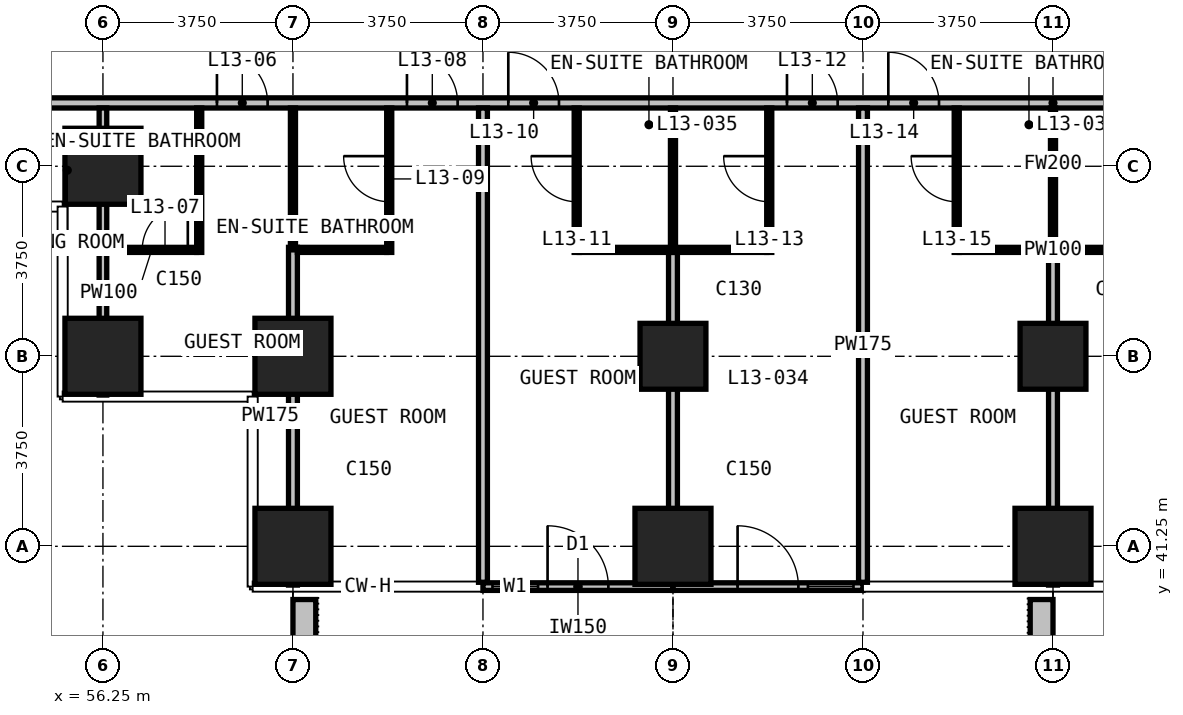
"""IFC4 building model, lengths in metres.
Left out: names, types, materials, properties, quantities, classifications, styles, units other than length and angle.
Written with IfcOpenShell. Run it as: python <this file> out.ifc"""

import sys

from ifc_helpers import new_model, si_unit, direction, frame, frame_2d, origin, origin_2d, place, context, subcontext, project, spatial, rectangle, extrude, element, fill, save


model = new_model("IFC4")
c1 = context("Model", 3, precision=1e-05, world=origin(), true_north=direction((0.0, 1.0)))
c2 = subcontext(c1, "Body", "Model", "MODEL_VIEW")
j1 = project(units=[si_unit("LENGTHUNIT", "METRE"), si_unit("PLANEANGLEUNIT", "RADIAN")], contexts=[c1])
p1 = place(None, origin())
s1 = spatial("IfcSite", under=j1, at=p1, CompositionType="ELEMENT")
p2 = place(p1, origin())
s2 = spatial("IfcBuilding", under=s1, at=p2, CompositionType="ELEMENT")
p3 = place(p2, frame((0.0, 0.0, 62.6)))
s3 = spatial("IfcBuildingStorey", under=s2, at=p3, CompositionType="ELEMENT", Elevation=62.6)
for number, where, z_axis, x_axis in (
    (1, (56.25, 45.0, 0.0), (0.0, 0.0, 1.0), (1.0, 0.0, 0.0)),
    (2, (56.25, 48.75, 0.0), (0.0, 0.0, 1.0), (1.0, 0.0, 0.0)),
    (3, (60.0, 41.25, 0.0), (0.0, 0.0, 1.0), (1.0, 0.0, 0.0)),
    (4, (60.0, 45.0, 0.0), (0.0, 0.0, 1.0), (1.0, 0.0, 0.0)),
    (5, (67.5, 41.25, 0.0), (0.0, 0.0, 1.0), (1.0, 0.0, 0.0)),
):
    element("IfcColumn", number, at=place(p3, frame(where, z_axis=z_axis, x_axis=x_axis)), inside=s3, PredefinedType="COLUMN", context=c2, shape_type="SweptSolid", body=[
        extrude(rectangle(XDim=1.5, YDim=1.5, at=origin_2d()), origin(), (0.0, 0.0, 1.0), 3.3),
    ])
p4 = place(p3, frame((67.5, 45.0, 0.0), z_axis=(0.0, 0.0, 1.0), x_axis=(1.0, 0.0, 0.0)))
e6 = element("IfcColumn", 6, at=p4, inside=s3, PredefinedType="COLUMN", context=c2, shape_type="SweptSolid", body=[
    extrude(rectangle(XDim=1.3, YDim=1.3, at=origin_2d()), origin(), (0.0, 0.0, 1.0), 3.3),
])
p5 = place(p3, frame((75.0, 41.25, 0.0), z_axis=(0.0, 0.0, 1.0), x_axis=(1.0, 0.0, 0.0)))
e7 = element("IfcColumn", 7, at=p5, inside=s3, PredefinedType="COLUMN", context=c2, shape_type="SweptSolid", body=[
    extrude(rectangle(XDim=1.5, YDim=1.5, at=origin_2d()), origin(), (0.0, 0.0, 1.0), 3.3),
])
p6 = place(p3, frame((75.0, 45.0, 0.0), z_axis=(0.0, 0.0, 1.0), x_axis=(1.0, 0.0, 0.0)))
e8 = element("IfcColumn", 8, at=p6, inside=s3, PredefinedType="COLUMN", context=c2, shape_type="SweptSolid", body=[
    extrude(rectangle(XDim=1.3, YDim=1.3, at=origin_2d()), origin(), (0.0, 0.0, 1.0), 3.3),
])
p7 = place(p3, frame((63.75, 40.455, 0.0), z_axis=(0.0, 0.0, 1.0), x_axis=(1.0, 0.0, 0.0)))
e9 = element("IfcWall", 9, at=p7, inside=s3, PredefinedType="SOLIDWALL", context=c2, shape_type="SweptSolid", body=[
    extrude(rectangle(XDim=3.75, YDim=0.15, at=frame_2d((1.875, 0.0))), origin(), (0.0, 0.0, 1.0), 3.0),
])
p8 = place(p7, frame((0.188, 0.0, 0.1)))
e10 = element("IfcOpeningElement", 10, at=p8, cuts=e9, PredefinedType="OPENING", context=c2, shape_type="SweptSolid", body=[
    extrude(rectangle(XDim=0.9, YDim=2.4, at=frame_2d((0.45, 1.2))), frame((0.0, 0.085, 0.0), z_axis=(0.0, -1.0, 0.0), x_axis=(1.0, 0.0, 0.0)), (0.0, 0.0, 1.0), 0.17),
])
p9 = place(p7, frame((1.275, 0.0, 0.0)))
e11 = element("IfcOpeningElement", 11, at=p9, cuts=e9, PredefinedType="OPENING", context=c2, shape_type="SweptSolid", body=[
    extrude(rectangle(XDim=1.2, YDim=2.4, at=frame_2d((0.6, 1.2))), frame((0.0, 0.085, 0.0), z_axis=(0.0, -1.0, 0.0), x_axis=(1.0, 0.0, 0.0)), (0.0, 0.0, 1.0), 0.17),
])
p10 = place(p3, frame((67.5, 40.455, 0.0), z_axis=(0.0, 0.0, 1.0), x_axis=(1.0, 0.0, 0.0)))
e12 = element("IfcWall", 12, at=p10, inside=s3, PredefinedType="SOLIDWALL", context=c2, shape_type="SweptSolid", body=[
    extrude(rectangle(XDim=3.75, YDim=0.15, at=frame_2d((1.875, 0.0))), origin(), (0.0, 0.0, 1.0), 3.0),
])
p11 = place(p10, frame((1.275, 0.0, 0.0)))
e13 = element("IfcOpeningElement", 13, at=p11, cuts=e12, PredefinedType="OPENING", context=c2, shape_type="SweptSolid", body=[
    extrude(rectangle(XDim=1.2, YDim=2.4, at=frame_2d((0.6, 1.2))), frame((0.0, 0.085, 0.0), z_axis=(0.0, -1.0, 0.0), x_axis=(1.0, 0.0, 0.0)), (0.0, 0.0, 1.0), 0.17),
])
p12 = place(p10, frame((2.663, 0.0, 0.1)))
e14 = element("IfcOpeningElement", 14, at=p12, cuts=e12, PredefinedType="OPENING", context=c2, shape_type="SweptSolid", body=[
    extrude(rectangle(XDim=0.9, YDim=2.4, at=frame_2d((0.45, 1.2))), frame((0.0, 0.085, 0.0), z_axis=(0.0, -1.0, 0.0), x_axis=(1.0, 0.0, 0.0)), (0.0, 0.0, 1.0), 0.17),
])
for number, where, z_axis, x_axis in (
    (15, (60.225, 40.2, 0.0), (0.0, 0.0, 1.0), (0.0, -1.0, 0.0)),
    (16, (74.775, 40.2, 0.0), (0.0, 0.0, 1.0), (0.0, -1.0, 0.0)),
):
    element("IfcWall", number, at=place(p3, frame(where, z_axis=z_axis, x_axis=x_axis)), inside=s3, PredefinedType="USERDEFINED", context=c2, shape_type="SweptSolid", body=[
        extrude(rectangle(XDim=2.35, YDim=0.45, at=frame_2d((1.175, 0.0))), origin(), (0.0, 0.0, 1.0), 1.1),
    ])
p13 = place(p3, frame((51.735, 50.0, 0.0), z_axis=(0.0, 0.0, 1.0), x_axis=(1.0, 0.0, 0.0)))
e17 = element("IfcWall", 17, at=p13, inside=s3, PredefinedType="PARTITIONING", context=c2, shape_type="SweptSolid", body=[
    extrude(rectangle(XDim=46.53, YDim=0.2, at=frame_2d((23.265, 0.0))), origin(), (0.0, 0.0, 1.0), 3.0),
])
p14 = place(p13, frame((6.765, 0.0, 0.0)))
e18 = element("IfcOpeningElement", 18, at=p14, cuts=e17, PredefinedType="OPENING", context=c2, shape_type="SweptSolid", body=[
    extrude(rectangle(XDim=1.0, YDim=2.2, at=frame_2d((0.5, 1.1))), frame((0.0, 0.11, 0.0), z_axis=(0.0, -1.0, 0.0), x_axis=(1.0, 0.0, 0.0)), (0.0, 0.0, 1.0), 0.22),
])
p15 = place(p13, frame((10.515, 0.0, 0.0)))
e19 = element("IfcOpeningElement", 19, at=p15, cuts=e17, PredefinedType="OPENING", context=c2, shape_type="SweptSolid", body=[
    extrude(rectangle(XDim=1.0, YDim=2.2, at=frame_2d((0.5, 1.1))), frame((0.0, 0.11, 0.0), z_axis=(0.0, -1.0, 0.0), x_axis=(1.0, 0.0, 0.0)), (0.0, 0.0, 1.0), 0.22),
])
p16 = place(p13, frame((12.515, 0.0, 0.0)))
e20 = element("IfcOpeningElement", 20, at=p16, cuts=e17, PredefinedType="OPENING", context=c2, shape_type="SweptSolid", body=[
    extrude(rectangle(XDim=1.0, YDim=2.2, at=frame_2d((0.5, 1.1))), frame((0.0, 0.11, 0.0), z_axis=(0.0, -1.0, 0.0), x_axis=(1.0, 0.0, 0.0)), (0.0, 0.0, 1.0), 0.22),
])
p17 = place(p13, frame((18.015, 0.0, 0.0)))
e21 = element("IfcOpeningElement", 21, at=p17, cuts=e17, PredefinedType="OPENING", context=c2, shape_type="SweptSolid", body=[
    extrude(rectangle(XDim=1.0, YDim=2.2, at=frame_2d((0.5, 1.1))), frame((0.0, 0.11, 0.0), z_axis=(0.0, -1.0, 0.0), x_axis=(1.0, 0.0, 0.0)), (0.0, 0.0, 1.0), 0.22),
])
p18 = place(p13, frame((20.015, 0.0, 0.0)))
e22 = element("IfcOpeningElement", 22, at=p18, cuts=e17, PredefinedType="OPENING", context=c2, shape_type="SweptSolid", body=[
    extrude(rectangle(XDim=1.0, YDim=2.2, at=frame_2d((0.5, 1.1))), frame((0.0, 0.11, 0.0), z_axis=(0.0, -1.0, 0.0), x_axis=(1.0, 0.0, 0.0)), (0.0, 0.0, 1.0), 0.22),
])
p19 = place(p13, frame((25.515, 0.0, 0.0)))
e23 = element("IfcOpeningElement", 23, at=p19, cuts=e17, PredefinedType="OPENING", context=c2, shape_type="SweptSolid", body=[
    extrude(rectangle(XDim=1.0, YDim=2.2, at=frame_2d((0.5, 1.1))), frame((0.0, 0.11, 0.0), z_axis=(0.0, -1.0, 0.0), x_axis=(1.0, 0.0, 0.0)), (0.0, 0.0, 1.0), 0.22),
])
p20 = place(p13, frame((27.515, 0.0, 0.0)))
e24 = element("IfcOpeningElement", 24, at=p20, cuts=e17, PredefinedType="OPENING", context=c2, shape_type="SweptSolid", body=[
    extrude(rectangle(XDim=1.0, YDim=2.2, at=frame_2d((0.5, 1.1))), frame((0.0, 0.11, 0.0), z_axis=(0.0, -1.0, 0.0), x_axis=(1.0, 0.0, 0.0)), (0.0, 0.0, 1.0), 0.22),
])
p21 = place(p13, frame((33.015, 0.0, 0.0)))
e25 = element("IfcOpeningElement", 25, at=p21, cuts=e17, PredefinedType="OPENING", context=c2, shape_type="SweptSolid", body=[
    extrude(rectangle(XDim=1.0, YDim=2.2, at=frame_2d((0.5, 1.1))), frame((0.0, 0.11, 0.0), z_axis=(0.0, -1.0, 0.0), x_axis=(1.0, 0.0, 0.0)), (0.0, 0.0, 1.0), 0.22),
])
p22 = place(p13, frame((35.015, 0.0, 0.0)))
e26 = element("IfcOpeningElement", 26, at=p22, cuts=e17, PredefinedType="OPENING", context=c2, shape_type="SweptSolid", body=[
    extrude(rectangle(XDim=1.0, YDim=2.2, at=frame_2d((0.5, 1.1))), frame((0.0, 0.11, 0.0), z_axis=(0.0, -1.0, 0.0), x_axis=(1.0, 0.0, 0.0)), (0.0, 0.0, 1.0), 0.22),
])
p23 = place(p13, frame((38.765, 0.0, 0.0)))
e27 = element("IfcOpeningElement", 27, at=p23, cuts=e17, PredefinedType="OPENING", context=c2, shape_type="SweptSolid", body=[
    extrude(rectangle(XDim=1.0, YDim=2.2, at=frame_2d((0.5, 1.1))), frame((0.0, 0.11, 0.0), z_axis=(0.0, -1.0, 0.0), x_axis=(1.0, 0.0, 0.0)), (0.0, 0.0, 1.0), 0.22),
])
p24 = place(p13, frame((1.8, 0.0, 0.0)))
e28 = element("IfcOpeningElement", 28, at=p24, cuts=e17, PredefinedType="OPENING", context=c2, shape_type="SweptSolid", body=[
    extrude(rectangle(XDim=0.9, YDim=2.2, at=frame_2d((0.45, 1.1))), frame((0.0, 0.11, 0.0), z_axis=(0.0, -1.0, 0.0), x_axis=(1.0, 0.0, 0.0)), (0.0, 0.0, 1.0), 0.22),
])
p25 = place(p13, frame((43.815, 0.0, 0.0)))
e29 = element("IfcOpeningElement", 29, at=p25, cuts=e17, PredefinedType="OPENING", context=c2, shape_type="SweptSolid", body=[
    extrude(rectangle(XDim=0.9, YDim=2.2, at=frame_2d((0.45, 1.1))), frame((0.0, 0.11, 0.0), z_axis=(0.0, -1.0, 0.0), x_axis=(1.0, 0.0, 0.0)), (0.0, 0.0, 1.0), 0.22),
])
p26 = place(p3, frame((60.0, 40.485, 0.0), z_axis=(0.0, 0.0, 1.0), x_axis=(0.0, 1.0, 0.0)))
e30 = element("IfcWall", 30, at=p26, inside=s3, PredefinedType="PARTITIONING", context=c2, shape_type="SweptSolid", body=[
    extrude(rectangle(XDim=6.665, YDim=0.175, at=frame_2d((3.333, 0.0))), origin(), (0.0, 0.0, 1.0), 3.0),
])
p27 = place(p3, frame((63.75, 40.54, 0.0), z_axis=(0.0, 0.0, 1.0), x_axis=(0.0, 1.0, 0.0)))
e31 = element("IfcWall", 31, at=p27, inside=s3, PredefinedType="PARTITIONING", context=c2, shape_type="SweptSolid", body=[
    extrude(rectangle(XDim=9.36, YDim=0.175, at=frame_2d((4.68, 0.0))), origin(), (0.0, 0.0, 1.0), 3.0),
])
p28 = place(p3, frame((67.5, 40.54, 0.0), z_axis=(0.0, 0.0, 1.0), x_axis=(0.0, 1.0, 0.0)))
e32 = element("IfcWall", 32, at=p28, inside=s3, PredefinedType="PARTITIONING", context=c2, shape_type="SweptSolid", body=[
    extrude(rectangle(XDim=6.51, YDim=0.175, at=frame_2d((3.255, 0.0))), origin(), (0.0, 0.0, 1.0), 3.0),
])
p29 = place(p3, frame((71.25, 40.54, 0.0), z_axis=(0.0, 0.0, 1.0), x_axis=(0.0, 1.0, 0.0)))
e33 = element("IfcWall", 33, at=p29, inside=s3, PredefinedType="PARTITIONING", context=c2, shape_type="SweptSolid", body=[
    extrude(rectangle(XDim=9.36, YDim=0.175, at=frame_2d((4.68, 0.0))), origin(), (0.0, 0.0, 1.0), 3.0),
])
p30 = place(p3, frame((75.0, 40.485, 0.0), z_axis=(0.0, 0.0, 1.0), x_axis=(0.0, 1.0, 0.0)))
e34 = element("IfcWall", 34, at=p30, inside=s3, PredefinedType="PARTITIONING", context=c2, shape_type="SweptSolid", body=[
    extrude(rectangle(XDim=6.565, YDim=0.175, at=frame_2d((3.282, 0.0))), origin(), (0.0, 0.0, 1.0), 3.0),
])
p31 = place(p3, frame((56.25, 44.235, 0.0), z_axis=(0.0, 0.0, 1.0), x_axis=(0.0, 1.0, 0.0)))
e35 = element("IfcWall", 35, at=p31, inside=s3, PredefinedType="PARTITIONING", context=c2, shape_type="SweptSolid", body=[
    extrude(rectangle(XDim=5.665, YDim=0.15, at=frame_2d((2.833, 0.0))), origin(), (0.0, 0.0, 1.0), 3.0),
])
p32 = place(p3, frame((56.325, 47.1, 0.0), z_axis=(0.0, 0.0, 1.0), x_axis=(1.0, 0.0, 0.0)))
e36 = element("IfcWall", 36, at=p32, inside=s3, PredefinedType="PARTITIONING", context=c2, shape_type="SweptSolid", body=[
    extrude(rectangle(XDim=1.775, YDim=0.1, at=frame_2d((0.888, 0.0))), origin(), (0.0, 0.0, 1.0), 3.0),
])
p33 = place(p32, frame((0.7, 0.0, 0.0)))
e37 = element("IfcOpeningElement", 37, at=p33, cuts=e36, PredefinedType="OPENING", context=c2, shape_type="SweptSolid", body=[
    extrude(rectangle(XDim=0.9, YDim=2.2, at=frame_2d((0.45, 1.1))), frame((0.0, 0.06, 0.0), z_axis=(0.0, -1.0, 0.0), x_axis=(1.0, 0.0, 0.0)), (0.0, 0.0, 1.0), 0.12),
])
p34 = place(p3, frame((60.088, 47.1, 0.0), z_axis=(0.0, 0.0, 1.0), x_axis=(1.0, 0.0, 0.0)))
e38 = element("IfcWall", 38, at=p34, inside=s3, PredefinedType="PARTITIONING", context=c2, shape_type="SweptSolid", body=[
    extrude(rectangle(XDim=1.762, YDim=0.1, at=frame_2d((0.881, 0.0))), origin(), (0.0, 0.0, 1.0), 3.0),
])
for number, where, z_axis, x_axis in (
    (39, (65.65, 47.1, 0.0), (0.0, 0.0, 1.0), (1.0, 0.0, 0.0)),
    (40, (73.15, 47.1, 0.0), (0.0, 0.0, 1.0), (1.0, 0.0, 0.0)),
):
    element("IfcWall", number, at=place(p3, frame(where, z_axis=z_axis, x_axis=x_axis)), inside=s3, PredefinedType="PARTITIONING", context=c2, shape_type="SweptSolid", body=[
        extrude(rectangle(XDim=3.7, YDim=0.1, at=frame_2d((1.85, 0.0))), origin(), (0.0, 0.0, 1.0), 3.0),
    ])
p35 = place(p3, frame((58.15, 47.05, 0.0), z_axis=(0.0, 0.0, 1.0), x_axis=(0.0, 1.0, 0.0)))
e41 = element("IfcWall", 41, at=p35, inside=s3, PredefinedType="PARTITIONING", context=c2, shape_type="SweptSolid", body=[
    extrude(rectangle(XDim=2.85, YDim=0.1, at=frame_2d((1.425, 0.0))), origin(), (0.0, 0.0, 1.0), 3.0),
])
p36 = place(p3, frame((60.0, 47.1, 0.0), z_axis=(0.0, 0.0, 1.0), x_axis=(0.0, 1.0, 0.0)))
e42 = element("IfcWall", 42, at=p36, inside=s3, PredefinedType="PARTITIONING", context=c2, shape_type="SweptSolid", body=[
    extrude(rectangle(XDim=2.8, YDim=0.1, at=frame_2d((1.4, 0.0))), origin(), (0.0, 0.0, 1.0), 3.0),
])
p37 = place(p3, frame((61.9, 47.05, 0.0), z_axis=(0.0, 0.0, 1.0), x_axis=(0.0, 1.0, 0.0)))
e43 = element("IfcWall", 43, at=p37, inside=s3, PredefinedType="PARTITIONING", context=c2, shape_type="SweptSolid", body=[
    extrude(rectangle(XDim=2.85, YDim=0.1, at=frame_2d((1.425, 0.0))), origin(), (0.0, 0.0, 1.0), 3.0),
])
p38 = place(p37, frame((1.0, 0.0, 0.0)))
e44 = element("IfcOpeningElement", 44, at=p38, cuts=e43, PredefinedType="OPENING", context=c2, shape_type="SweptSolid", body=[
    extrude(rectangle(XDim=0.9, YDim=2.2, at=frame_2d((0.45, 1.1))), frame((0.0, 0.06, 0.0), z_axis=(0.0, -1.0, 0.0), x_axis=(1.0, 0.0, 0.0)), (0.0, 0.0, 1.0), 0.12),
])
p39 = place(p3, frame((65.6, 47.05, 0.0), z_axis=(0.0, 0.0, 1.0), x_axis=(0.0, 1.0, 0.0)))
e45 = element("IfcWall", 45, at=p39, inside=s3, PredefinedType="PARTITIONING", context=c2, shape_type="SweptSolid", body=[
    extrude(rectangle(XDim=2.85, YDim=0.1, at=frame_2d((1.425, 0.0))), origin(), (0.0, 0.0, 1.0), 3.0),
])
p40 = place(p39, frame((1.0, 0.0, 0.0)))
e46 = element("IfcOpeningElement", 46, at=p40, cuts=e45, PredefinedType="OPENING", context=c2, shape_type="SweptSolid", body=[
    extrude(rectangle(XDim=0.9, YDim=2.2, at=frame_2d((0.45, 1.1))), frame((0.0, 0.06, 0.0), z_axis=(0.0, -1.0, 0.0), x_axis=(1.0, 0.0, 0.0)), (0.0, 0.0, 1.0), 0.12),
])
p41 = place(p3, frame((67.5, 47.15, 0.0), z_axis=(0.0, 0.0, 1.0), x_axis=(0.0, 1.0, 0.0)))
e47 = element("IfcWall", 47, at=p41, inside=s3, PredefinedType="PARTITIONING", context=c2, shape_type="SweptSolid", body=[
    extrude(rectangle(XDim=2.75, YDim=0.1, at=frame_2d((1.375, 0.0))), origin(), (0.0, 0.0, 1.0), 3.0),
])
p42 = place(p3, frame((69.4, 47.05, 0.0), z_axis=(0.0, 0.0, 1.0), x_axis=(0.0, 1.0, 0.0)))
e48 = element("IfcWall", 48, at=p42, inside=s3, PredefinedType="PARTITIONING", context=c2, shape_type="SweptSolid", body=[
    extrude(rectangle(XDim=2.85, YDim=0.1, at=frame_2d((1.425, 0.0))), origin(), (0.0, 0.0, 1.0), 3.0),
])
p43 = place(p42, frame((1.0, 0.0, 0.0)))
e49 = element("IfcOpeningElement", 49, at=p43, cuts=e48, PredefinedType="OPENING", context=c2, shape_type="SweptSolid", body=[
    extrude(rectangle(XDim=0.9, YDim=2.2, at=frame_2d((0.45, 1.1))), frame((0.0, 0.06, 0.0), z_axis=(0.0, -1.0, 0.0), x_axis=(1.0, 0.0, 0.0)), (0.0, 0.0, 1.0), 0.12),
])
p44 = place(p3, frame((73.1, 47.05, 0.0), z_axis=(0.0, 0.0, 1.0), x_axis=(0.0, 1.0, 0.0)))
e50 = element("IfcWall", 50, at=p44, inside=s3, PredefinedType="PARTITIONING", context=c2, shape_type="SweptSolid", body=[
    extrude(rectangle(XDim=2.85, YDim=0.1, at=frame_2d((1.425, 0.0))), origin(), (0.0, 0.0, 1.0), 3.0),
])
p45 = place(p44, frame((1.0, 0.0, 0.0)))
e51 = element("IfcOpeningElement", 51, at=p45, cuts=e50, PredefinedType="OPENING", context=c2, shape_type="SweptSolid", body=[
    extrude(rectangle(XDim=0.9, YDim=2.2, at=frame_2d((0.45, 1.1))), frame((0.0, 0.06, 0.0), z_axis=(0.0, -1.0, 0.0), x_axis=(1.0, 0.0, 0.0)), (0.0, 0.0, 1.0), 0.12),
])
p46 = place(p3, frame((75.0, 47.15, 0.0), z_axis=(0.0, 0.0, 1.0), x_axis=(0.0, 1.0, 0.0)))
e52 = element("IfcWall", 52, at=p46, inside=s3, PredefinedType="PARTITIONING", context=c2, shape_type="SweptSolid", body=[
    extrude(rectangle(XDim=2.75, YDim=0.1, at=frame_2d((1.375, 0.0))), origin(), (0.0, 0.0, 1.0), 3.0),
])
p47 = place(p8, origin())
e53 = element("IfcWindow", 53, at=p47, inside=s3, PartitioningType="SINGLE_PANEL", PredefinedType="WINDOW", context=c2, shape_type="SweptSolid", body=[
    extrude(rectangle(XDim=0.9, YDim=2.4, at=frame_2d((0.45, 1.2))), frame((0.0, 0.03, 0.0), z_axis=(0.0, -1.0, 0.0), x_axis=(1.0, 0.0, 0.0)), (0.0, 0.0, 1.0), 0.06),
])
fill(e10, e53)
p48 = place(p9, origin())
e54 = element("IfcDoor", 54, at=p48, inside=s3, OperationType="SINGLE_SWING_LEFT", PredefinedType="DOOR", context=c2, shape_type="SweptSolid", body=[
    extrude(rectangle(XDim=1.2, YDim=2.4, at=frame_2d((0.6, 1.2))), frame((0.0, 0.025, 0.0), z_axis=(0.0, -1.0, 0.0), x_axis=(1.0, 0.0, 0.0)), (0.0, 0.0, 1.0), 0.05),
])
fill(e11, e54)
p49 = place(p11, origin())
e55 = element("IfcDoor", 55, at=p49, inside=s3, OperationType="SINGLE_SWING_LEFT", PredefinedType="DOOR", context=c2, shape_type="SweptSolid", body=[
    extrude(rectangle(XDim=1.2, YDim=2.4, at=frame_2d((0.6, 1.2))), frame((0.0, 0.025, 0.0), z_axis=(0.0, -1.0, 0.0), x_axis=(1.0, 0.0, 0.0)), (0.0, 0.0, 1.0), 0.05),
])
fill(e13, e55)
p50 = place(p12, origin())
e56 = element("IfcWindow", 56, at=p50, inside=s3, PartitioningType="SINGLE_PANEL", PredefinedType="WINDOW", context=c2, shape_type="SweptSolid", body=[
    extrude(rectangle(XDim=0.9, YDim=2.4, at=frame_2d((0.45, 1.2))), frame((0.0, 0.03, 0.0), z_axis=(0.0, -1.0, 0.0), x_axis=(1.0, 0.0, 0.0)), (0.0, 0.0, 1.0), 0.06),
])
fill(e14, e56)
p51 = place(p14, origin())
e57 = element("IfcDoor", 57, at=p51, inside=s3, OperationType="SINGLE_SWING_RIGHT", PredefinedType="DOOR", context=c2, shape_type="SweptSolid", body=[
    extrude(rectangle(XDim=1.0, YDim=2.2, at=frame_2d((0.5, 1.1))), frame((0.0, 0.025, 0.0), z_axis=(0.0, -1.0, 0.0), x_axis=(1.0, 0.0, 0.0)), (0.0, 0.0, 1.0), 0.05),
])
fill(e18, e57)
p52 = place(p33, origin())
e58 = element("IfcDoor", 58, at=p52, inside=s3, OperationType="SINGLE_SWING_RIGHT", PredefinedType="DOOR", context=c2, shape_type="SweptSolid", body=[
    extrude(rectangle(XDim=0.9, YDim=2.2, at=frame_2d((0.45, 1.1))), frame((0.0, 0.025, 0.0), z_axis=(0.0, -1.0, 0.0), x_axis=(1.0, 0.0, 0.0)), (0.0, 0.0, 1.0), 0.05),
])
fill(e37, e58)
p53 = place(p15, origin())
e59 = element("IfcDoor", 59, at=p53, inside=s3, OperationType="SINGLE_SWING_RIGHT", PredefinedType="DOOR", context=c2, shape_type="SweptSolid", body=[
    extrude(rectangle(XDim=1.0, YDim=2.2, at=frame_2d((0.5, 1.1))), frame((0.0, 0.025, 0.0), z_axis=(0.0, -1.0, 0.0), x_axis=(1.0, 0.0, 0.0)), (0.0, 0.0, 1.0), 0.05),
])
fill(e19, e59)
p54 = place(p38, origin())
e60 = element("IfcDoor", 60, at=p54, inside=s3, OperationType="SINGLE_SWING_RIGHT", PredefinedType="DOOR", context=c2, shape_type="SweptSolid", body=[
    extrude(rectangle(XDim=0.9, YDim=2.2, at=frame_2d((0.45, 1.1))), frame((0.0, 0.025, 0.0), z_axis=(0.0, -1.0, 0.0), x_axis=(1.0, 0.0, 0.0)), (0.0, 0.0, 1.0), 0.05),
])
fill(e44, e60)
p55 = place(p16, origin())
e61 = element("IfcDoor", 61, at=p55, inside=s3, OperationType="SINGLE_SWING_RIGHT", PredefinedType="DOOR", context=c2, shape_type="SweptSolid", body=[
    extrude(rectangle(XDim=1.0, YDim=2.2, at=frame_2d((0.5, 1.1))), frame((0.0, 0.025, 0.0), z_axis=(0.0, -1.0, 0.0), x_axis=(1.0, 0.0, 0.0)), (0.0, 0.0, 1.0), 0.05),
])
fill(e20, e61)
p56 = place(p40, origin())
e62 = element("IfcDoor", 62, at=p56, inside=s3, OperationType="SINGLE_SWING_RIGHT", PredefinedType="DOOR", context=c2, shape_type="SweptSolid", body=[
    extrude(rectangle(XDim=0.9, YDim=2.2, at=frame_2d((0.45, 1.1))), frame((0.0, 0.025, 0.0), z_axis=(0.0, -1.0, 0.0), x_axis=(1.0, 0.0, 0.0)), (0.0, 0.0, 1.0), 0.05),
])
fill(e46, e62)
p57 = place(p17, origin())
e63 = element("IfcDoor", 63, at=p57, inside=s3, OperationType="SINGLE_SWING_LEFT", PredefinedType="DOOR", context=c2, shape_type="SweptSolid", body=[
    extrude(rectangle(XDim=1.0, YDim=2.2, at=frame_2d((0.5, 1.1))), frame((0.0, 0.025, 0.0), z_axis=(0.0, -1.0, 0.0), x_axis=(1.0, 0.0, 0.0)), (0.0, 0.0, 1.0), 0.05),
])
fill(e21, e63)
p58 = place(p43, origin())
e64 = element("IfcDoor", 64, at=p58, inside=s3, OperationType="SINGLE_SWING_RIGHT", PredefinedType="DOOR", context=c2, shape_type="SweptSolid", body=[
    extrude(rectangle(XDim=0.9, YDim=2.2, at=frame_2d((0.45, 1.1))), frame((0.0, 0.025, 0.0), z_axis=(0.0, -1.0, 0.0), x_axis=(1.0, 0.0, 0.0)), (0.0, 0.0, 1.0), 0.05),
])
fill(e49, e64)
p59 = place(p18, origin())
e65 = element("IfcDoor", 65, at=p59, inside=s3, OperationType="SINGLE_SWING_RIGHT", PredefinedType="DOOR", context=c2, shape_type="SweptSolid", body=[
    extrude(rectangle(XDim=1.0, YDim=2.2, at=frame_2d((0.5, 1.1))), frame((0.0, 0.025, 0.0), z_axis=(0.0, -1.0, 0.0), x_axis=(1.0, 0.0, 0.0)), (0.0, 0.0, 1.0), 0.05),
])
fill(e22, e65)
p60 = place(p45, origin())
e66 = element("IfcDoor", 66, at=p60, inside=s3, OperationType="SINGLE_SWING_RIGHT", PredefinedType="DOOR", context=c2, shape_type="SweptSolid", body=[
    extrude(rectangle(XDim=0.9, YDim=2.2, at=frame_2d((0.45, 1.1))), frame((0.0, 0.025, 0.0), z_axis=(0.0, -1.0, 0.0), x_axis=(1.0, 0.0, 0.0)), (0.0, 0.0, 1.0), 0.05),
])
fill(e51, e66)
save(model, sys.argv[1])
